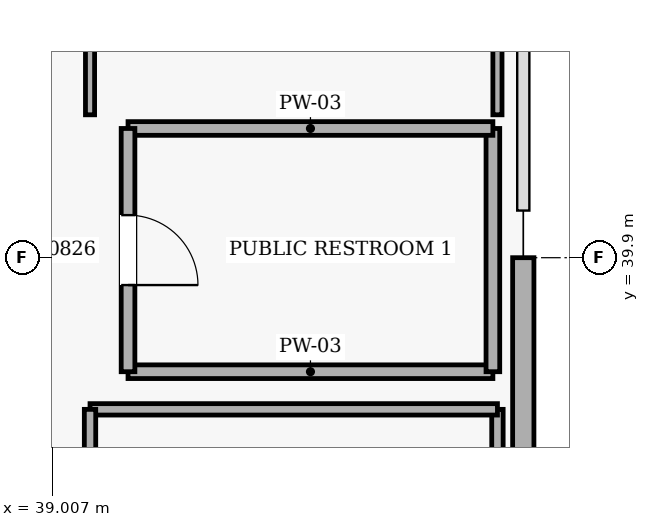
"""IFC4 building model, lengths in metres.
Left out: names, types, materials, properties, quantities, classifications, styles, units other than length and angle.
Written with IfcOpenShell. Run it as: python <this file> out.ifc"""

import sys

from ifc_helpers import new_model, si_unit, direction, frame, frame_2d, origin, place, context, subcontext, project, spatial, rectangle, extrude, element, fill, save


model = new_model("IFC4")
c1 = context("Model", 3, precision=1e-05, world=origin(), true_north=direction((0.0, 1.0)))
c2 = subcontext(c1, "Body", "Model", "MODEL_VIEW")
j1 = project(units=[si_unit("LENGTHUNIT", "METRE"), si_unit("PLANEANGLEUNIT", "RADIAN")], contexts=[c1])
p1 = place(None, origin())
s1 = spatial("IfcSite", under=j1, at=p1, CompositionType="ELEMENT")
p2 = place(p1, origin())
s2 = spatial("IfcBuilding", under=s1, at=p2, CompositionType="ELEMENT")
p3 = place(p2, frame((0.0, 0.0, 29.4)))
s3 = spatial("IfcBuildingStorey", under=s2, at=p3, CompositionType="ELEMENT", Elevation=29.4)
p4 = place(p3, frame((45.2, 39.9, 0.0), z_axis=(0.0, 0.0, 1.0), x_axis=(0.0, -1.0, 0.0)))
e1 = element("IfcWall", 1, at=p4, inside=s3, PredefinedType="SOLIDWALL", context=c2, shape_type="SweptSolid", body=[
    extrude(rectangle(XDim=14.4, YDim=0.28, at=frame_2d((7.2, 0.0))), origin(), (0.0, 0.0, 1.0), 4.48),
])
p5 = place(p4, frame((5.5, 0.0, 0.9)))
e2 = element("IfcOpeningElement", 2, at=p5, cuts=e1, PredefinedType="OPENING", context=c2, shape_type="SweptSolid", body=[
    extrude(rectangle(XDim=3.4, YDim=2.1, at=frame_2d((1.7, 1.05))), frame((0.0, 0.15, 0.0), z_axis=(0.0, -1.0, 0.0), x_axis=(1.0, 0.0, 0.0)), (0.0, 0.0, 1.0), 0.3),
])
p6 = place(p3, frame((40.0, 38.4, 0.0), z_axis=(0.0, 0.0, 1.0), x_axis=(1.0, 0.0, 0.0)))
e3 = element("IfcWall", 3, at=p6, inside=s3, PredefinedType="PARTITIONING", context=c2, shape_type="SweptSolid", body=[
    extrude(rectangle(XDim=4.8, YDim=0.18, at=frame_2d((2.4, 0.0))), origin(), (0.0, 0.0, 1.0), 4.5),
])
p7 = place(p3, frame((44.8, 38.4, 0.0), z_axis=(0.0, 0.0, 1.0), x_axis=(0.0, 1.0, 0.0)))
e4 = element("IfcWall", 4, at=p7, inside=s3, PredefinedType="PARTITIONING", context=c2, shape_type="SweptSolid", body=[
    extrude(rectangle(XDim=3.2, YDim=0.18, at=frame_2d((1.6, 0.0))), origin(), (0.0, 0.0, 1.0), 4.5),
])
p8 = place(p3, frame((44.8, 41.6, 0.0), z_axis=(0.0, 0.0, 1.0), x_axis=(-1.0, 0.0, 0.0)))
e5 = element("IfcWall", 5, at=p8, inside=s3, PredefinedType="PARTITIONING", context=c2, shape_type="SweptSolid", body=[
    extrude(rectangle(XDim=4.8, YDim=0.18, at=frame_2d((2.4, 0.0))), origin(), (0.0, 0.0, 1.0), 4.5),
])
p9 = place(p3, frame((40.0, 41.6, 0.0), z_axis=(0.0, 0.0, 1.0), x_axis=(0.0, -1.0, 0.0)))
e6 = element("IfcWall", 6, at=p9, inside=s3, PredefinedType="PARTITIONING", context=c2, shape_type="SweptSolid", body=[
    extrude(rectangle(XDim=3.2, YDim=0.18, at=frame_2d((1.6, 0.0))), origin(), (0.0, 0.0, 1.0), 4.5),
])
p10 = place(p9, frame((1.14, 0.0, 0.0)))
e7 = element("IfcOpeningElement", 7, at=p10, cuts=e6, PredefinedType="OPENING", context=c2, shape_type="SweptSolid", body=[
    extrude(rectangle(XDim=0.92, YDim=2.1, at=frame_2d((0.46, 1.05))), frame((0.0, 0.1, 0.0), z_axis=(0.0, -1.0, 0.0), x_axis=(1.0, 0.0, 0.0)), (0.0, 0.0, 1.0), 0.2),
])
p11 = place(p3, frame((44.86, 25.535, 0.0), z_axis=(0.0, 0.0, 1.0), x_axis=(0.0, 1.0, 0.0)))
e8 = element("IfcWall", 8, at=p11, inside=s3, PredefinedType="PARTITIONING", context=c2, shape_type="SweptSolid", body=[
    extrude(rectangle(XDim=12.37, YDim=0.15, at=frame_2d((6.185, 0.0))), origin(), (0.0, 0.0, 1.0), 4.5),
])
p12 = place(p3, frame((44.86, 37.905, 0.0), z_axis=(0.0, 0.0, 1.0), x_axis=(-1.0, 0.0, 0.0)))
e9 = element("IfcWall", 9, at=p12, inside=s3, PredefinedType="PARTITIONING", context=c2, shape_type="SweptSolid", body=[
    extrude(rectangle(XDim=5.36, YDim=0.15, at=frame_2d((2.68, 0.0))), origin(), (0.0, 0.0, 1.0), 4.5),
])
p13 = place(p3, frame((39.5, 37.905, 0.0), z_axis=(0.0, 0.0, 1.0), x_axis=(0.0, -1.0, 0.0)))
e10 = element("IfcWall", 10, at=p13, inside=s3, PredefinedType="PARTITIONING", context=c2, shape_type="SweptSolid", body=[
    extrude(rectangle(XDim=12.37, YDim=0.15, at=frame_2d((6.185, 0.0))), origin(), (0.0, 0.0, 1.0), 4.5),
])
p14 = place(p13, frame((5.535, 0.0, 0.0)))
e11 = element("IfcOpeningElement", 11, at=p14, cuts=e10, PredefinedType="OPENING", context=c2, shape_type="SweptSolid", body=[
    extrude(rectangle(XDim=1.3, YDim=2.2, at=frame_2d((0.65, 1.1))), frame((0.0, 0.085, 0.0), z_axis=(0.0, -1.0, 0.0), x_axis=(1.0, 0.0, 0.0)), (0.0, 0.0, 1.0), 0.17),
])
p15 = place(p3, frame((44.86, 41.78, 0.0), z_axis=(0.0, 0.0, 1.0), x_axis=(0.0, 1.0, 0.0)))
e12 = element("IfcWall", 12, at=p15, inside=s3, PredefinedType="PARTITIONING", context=c2, shape_type="SweptSolid", body=[
    extrude(rectangle(XDim=12.25, YDim=0.12, at=frame_2d((6.125, 0.0))), origin(), (0.0, 0.0, 1.0), 4.5),
])
p16 = place(p3, frame((39.5, 54.03, 0.0), z_axis=(0.0, 0.0, 1.0), x_axis=(0.0, -1.0, 0.0)))
e13 = element("IfcWall", 13, at=p16, inside=s3, PredefinedType="PARTITIONING", context=c2, shape_type="SweptSolid", body=[
    extrude(rectangle(XDim=12.25, YDim=0.12, at=frame_2d((6.125, 0.0))), origin(), (0.0, 0.0, 1.0), 4.5),
])
p17 = place(p16, frame((5.425, 0.0, 0.0)))
e14 = element("IfcOpeningElement", 14, at=p17, cuts=e13, PredefinedType="OPENING", context=c2, shape_type="SweptSolid", body=[
    extrude(rectangle(XDim=1.4, YDim=2.2, at=frame_2d((0.7, 1.1))), frame((0.0, 0.07, 0.0), z_axis=(0.0, -1.0, 0.0), x_axis=(1.0, 0.0, 0.0)), (0.0, 0.0, 1.0), 0.14),
])
p18 = place(p10, origin())
e15 = element("IfcDoor", 15, at=p18, inside=s3, OperationType="SINGLE_SWING_RIGHT", PredefinedType="DOOR", context=c2, shape_type="SweptSolid", body=[
    extrude(rectangle(XDim=0.92, YDim=2.1, at=frame_2d((0.46, 1.05))), frame((0.0, 0.025, 0.0), z_axis=(0.0, -1.0, 0.0), x_axis=(1.0, 0.0, 0.0)), (0.0, 0.0, 1.0), 0.05),
])
fill(e7, e15)
save(model, sys.argv[1])
